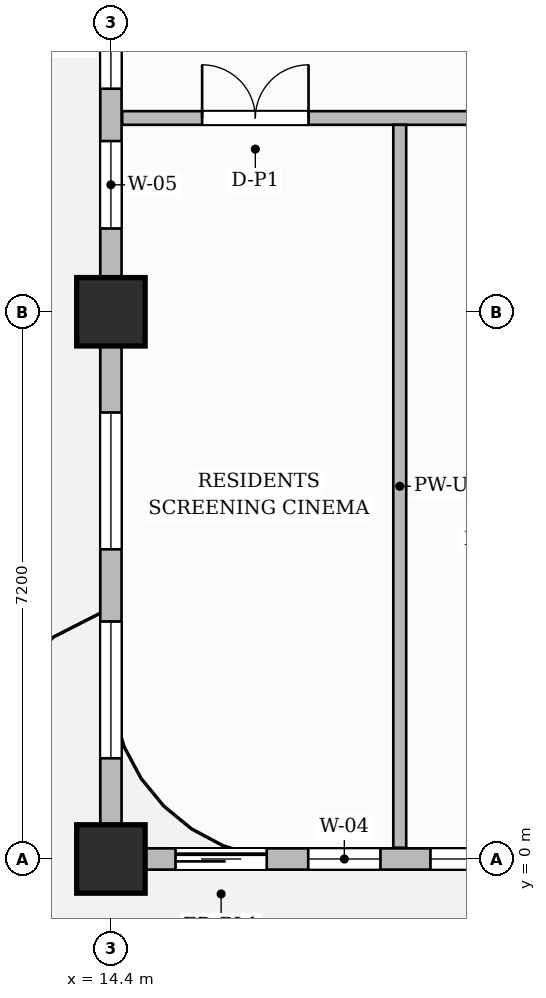
"""IFC4 building model, lengths in metres.
Left out: names, types, materials, properties, quantities, classifications, styles, units other than length and angle.
Written with IfcOpenShell. Run it as: python <this file> out.ifc"""

import sys

from ifc_helpers import new_model, si_unit, direction, frame, frame_2d, origin, origin_2d, place, context, subcontext, project, spatial, rectangle, extrude, source, transform, mapped, element, fill, save


model = new_model("IFC4")
c1 = context("Model", 3, precision=1e-05, world=origin(), true_north=direction((0.0, 1.0)))
c2 = subcontext(c1, "Body", "Model", "MODEL_VIEW")
j1 = project(units=[si_unit("LENGTHUNIT", "METRE"), si_unit("PLANEANGLEUNIT", "RADIAN")], contexts=[c1])
p1 = place(None, origin())
s1 = spatial("IfcSite", under=j1, at=p1, CompositionType="ELEMENT")
p2 = place(p1, origin())
s2 = spatial("IfcBuilding", under=s1, at=p2, CompositionType="ELEMENT")
p3 = place(p2, frame((0.0, 0.0, 228.85)))
s3 = spatial("IfcBuildingStorey", under=s2, at=p3, CompositionType="ELEMENT", Elevation=228.85)
m1 = source(origin(), c2, "Body", "SweptSolid", [
    extrude(rectangle(XDim=0.9, YDim=0.9, at=origin_2d()), origin(), (0.0, 0.0, 1.0), 3.85),
])
for number, where, z_axis, x_axis in (
    (1, (14.4, 0.0, 0.0), (0.0, 0.0, 1.0), (1.0, 0.0, 0.0)),
    (2, (14.4, 7.2, 0.0), (0.0, 0.0, 1.0), (1.0, 0.0, 0.0)),
):
    element("IfcColumn", number, at=place(p3, frame(where, z_axis=z_axis, x_axis=x_axis)), inside=s3, PredefinedType="COLUMN", context=c2, shape_type="MappedRepresentation", body=[
        mapped(m1, transform((0.0, 0.0, 0.0), scale=1.0)),
    ])
p4 = place(p3, frame((14.548, 9.75, 0.0), z_axis=(0.0, 0.0, 1.0), x_axis=(1.0, 0.0, 0.0)))
e3 = element("IfcWall", 3, at=p4, inside=s3, PredefinedType="PARTITIONING", context=c2, shape_type="SweptSolid", body=[
    extrude(rectangle(XDim=15.562, YDim=0.18, at=frame_2d((7.781, 0.0))), origin(), (0.0, 0.0, 1.0), 3.6),
])
p5 = place(p4, frame((1.052, 0.0, 0.0)))
e4 = element("IfcOpeningElement", 4, at=p5, cuts=e3, PredefinedType="OPENING", context=c2, shape_type="SweptSolid", body=[
    extrude(rectangle(XDim=1.4, YDim=2.35, at=frame_2d((0.7, 1.175))), frame((0.0, 0.1, 0.0), z_axis=(0.0, -1.0, 0.0), x_axis=(1.0, 0.0, 0.0)), (0.0, 0.0, 1.0), 0.2),
])
p6 = place(p4, frame((5.452, 0.0, 0.0)))
e5 = element("IfcOpeningElement", 5, at=p6, cuts=e3, PredefinedType="OPENING", context=c2, shape_type="SweptSolid", body=[
    extrude(rectangle(XDim=0.95, YDim=2.15, at=frame_2d((0.475, 1.075))), frame((0.0, 0.1, 0.0), z_axis=(0.0, -1.0, 0.0), x_axis=(1.0, 0.0, 0.0)), (0.0, 0.0, 1.0), 0.2),
])
p7 = place(p4, frame((10.807, 0.0, 0.0)))
e6 = element("IfcOpeningElement", 6, at=p7, cuts=e3, PredefinedType="OPENING", context=c2, shape_type="SweptSolid", body=[
    extrude(rectangle(XDim=1.05, YDim=2.25, at=frame_2d((0.525, 1.125))), frame((0.0, 0.1, 0.0), z_axis=(0.0, -1.0, 0.0), x_axis=(1.0, 0.0, 0.0)), (0.0, 0.0, 1.0), 0.2),
])
p8 = place(p3, frame((18.2, 0.148, 0.0), z_axis=(0.0, 0.0, 1.0), x_axis=(0.0, 1.0, 0.0)))
e7 = element("IfcWall", 7, at=p8, inside=s3, PredefinedType="PARTITIONING", context=c2, shape_type="SweptSolid", body=[
    extrude(rectangle(XDim=9.512, YDim=0.17, at=frame_2d((4.756, 0.0))), origin(), (0.0, 0.0, 1.0), 3.315),
])
p9 = place(p3, frame((14.4, 0.0, 0.0), z_axis=(0.0, 0.0, 1.0), x_axis=(1.0, 0.0, 0.0)))
e8 = element("IfcWall", 8, at=p9, inside=s3, PredefinedType="SOLIDWALL", context=c2, shape_type="SweptSolid", body=[
    extrude(rectangle(XDim=35.4, YDim=0.28, at=frame_2d((17.7, 0.0))), origin(), (0.0, 0.0, 1.0), 3.135),
])
p10 = place(p9, frame((0.85, 0.0, 0.0)))
e9 = element("IfcOpeningElement", 9, at=p10, cuts=e8, PredefinedType="OPENING", context=c2, shape_type="SweptSolid", body=[
    extrude(rectangle(XDim=1.2, YDim=2.2, at=frame_2d((0.6, 1.1))), frame((0.0, 0.15, 0.0), z_axis=(0.0, -1.0, 0.0), x_axis=(1.0, 0.0, 0.0)), (0.0, 0.0, 1.0), 0.3),
])
p11 = place(p9, frame((2.596, 0.0, 0.8)))
e10 = element("IfcOpeningElement", 10, at=p11, cuts=e8, PredefinedType="OPENING", context=c2, shape_type="SweptSolid", body=[
    extrude(rectangle(XDim=0.95, YDim=1.75, at=frame_2d((0.475, 0.875))), frame((0.0, 0.15, 0.0), z_axis=(0.0, -1.0, 0.0), x_axis=(1.0, 0.0, 0.0)), (0.0, 0.0, 1.0), 0.3),
])
p12 = place(p9, frame((4.204, 0.0, 0.8)))
e11 = element("IfcOpeningElement", 11, at=p12, cuts=e8, PredefinedType="OPENING", context=c2, shape_type="SweptSolid", body=[
    extrude(rectangle(XDim=1.8, YDim=1.85, at=frame_2d((0.9, 0.925))), frame((0.0, 0.15, 0.0), z_axis=(0.0, -1.0, 0.0), x_axis=(1.0, 0.0, 0.0)), (0.0, 0.0, 1.0), 0.3),
])
p13 = place(p9, frame((9.415, 0.0, 0.8)))
e12 = element("IfcOpeningElement", 12, at=p13, cuts=e8, PredefinedType="OPENING", context=c2, shape_type="SweptSolid", body=[
    extrude(rectangle(XDim=1.8, YDim=1.85, at=frame_2d((0.9, 0.925))), frame((0.0, 0.15, 0.0), z_axis=(0.0, -1.0, 0.0), x_axis=(1.0, 0.0, 0.0)), (0.0, 0.0, 1.0), 0.3),
])
p14 = place(p9, frame((12.469, 0.0, 0.8)))
e13 = element("IfcOpeningElement", 13, at=p14, cuts=e8, PredefinedType="OPENING", context=c2, shape_type="SweptSolid", body=[
    extrude(rectangle(XDim=0.95, YDim=1.75, at=frame_2d((0.475, 0.875))), frame((0.0, 0.15, 0.0), z_axis=(0.0, -1.0, 0.0), x_axis=(1.0, 0.0, 0.0)), (0.0, 0.0, 1.0), 0.3),
])
p15 = place(p9, frame((16.804, 0.0, 0.8)))
e14 = element("IfcOpeningElement", 14, at=p15, cuts=e8, PredefinedType="OPENING", context=c2, shape_type="SweptSolid", body=[
    extrude(rectangle(XDim=1.8, YDim=1.85, at=frame_2d((0.9, 0.925))), frame((0.0, 0.15, 0.0), z_axis=(0.0, -1.0, 0.0), x_axis=(1.0, 0.0, 0.0)), (0.0, 0.0, 1.0), 0.3),
])
p16 = place(p9, frame((22.396, 0.0, 0.8)))
e15 = element("IfcOpeningElement", 15, at=p16, cuts=e8, PredefinedType="OPENING", context=c2, shape_type="SweptSolid", body=[
    extrude(rectangle(XDim=1.8, YDim=1.85, at=frame_2d((0.9, 0.925))), frame((0.0, 0.15, 0.0), z_axis=(0.0, -1.0, 0.0), x_axis=(1.0, 0.0, 0.0)), (0.0, 0.0, 1.0), 0.3),
])
p17 = place(p9, frame((25.629, 0.0, 0.8)))
e16 = element("IfcOpeningElement", 16, at=p17, cuts=e8, PredefinedType="OPENING", context=c2, shape_type="SweptSolid", body=[
    extrude(rectangle(XDim=0.95, YDim=1.75, at=frame_2d((0.475, 0.875))), frame((0.0, 0.15, 0.0), z_axis=(0.0, -1.0, 0.0), x_axis=(1.0, 0.0, 0.0)), (0.0, 0.0, 1.0), 0.3),
])
p18 = place(p9, frame((29.075, 0.0, 0.8)))
e17 = element("IfcOpeningElement", 17, at=p18, cuts=e8, PredefinedType="OPENING", context=c2, shape_type="SweptSolid", body=[
    extrude(rectangle(XDim=1.8, YDim=1.85, at=frame_2d((0.9, 0.925))), frame((0.0, 0.15, 0.0), z_axis=(0.0, -1.0, 0.0), x_axis=(1.0, 0.0, 0.0)), (0.0, 0.0, 1.0), 0.3),
])
p19 = place(p9, frame((32.125, 0.0, 0.8)))
e18 = element("IfcOpeningElement", 18, at=p19, cuts=e8, PredefinedType="OPENING", context=c2, shape_type="SweptSolid", body=[
    extrude(rectangle(XDim=1.8, YDim=1.85, at=frame_2d((0.9, 0.925))), frame((0.0, 0.15, 0.0), z_axis=(0.0, -1.0, 0.0), x_axis=(1.0, 0.0, 0.0)), (0.0, 0.0, 1.0), 0.3),
])
p20 = place(p3, frame((14.4, 0.05, 0.0), z_axis=(0.0, 0.0, 1.0), x_axis=(0.0, 1.0, 0.0)))
e19 = element("IfcWall", 19, at=p20, inside=s3, PredefinedType="SOLIDWALL", context=c2, shape_type="SweptSolid", body=[
    extrude(rectangle(XDim=21.5, YDim=0.28, at=frame_2d((10.75, 0.0))), origin(), (0.0, 0.0, 1.0), 3.135),
])
p21 = place(p20, frame((1.275, 0.0, 0.8)))
e20 = element("IfcOpeningElement", 20, at=p21, cuts=e19, PredefinedType="OPENING", context=c2, shape_type="SweptSolid", body=[
    extrude(rectangle(XDim=1.8, YDim=1.85, at=frame_2d((0.9, 0.925))), frame((0.0, 0.15, 0.0), z_axis=(0.0, -1.0, 0.0), x_axis=(1.0, 0.0, 0.0)), (0.0, 0.0, 1.0), 0.3),
])
p22 = place(p20, frame((4.025, 0.0, 0.8)))
e21 = element("IfcOpeningElement", 21, at=p22, cuts=e19, PredefinedType="OPENING", context=c2, shape_type="SweptSolid", body=[
    extrude(rectangle(XDim=1.8, YDim=1.85, at=frame_2d((0.9, 0.925))), frame((0.0, 0.15, 0.0), z_axis=(0.0, -1.0, 0.0), x_axis=(1.0, 0.0, 0.0)), (0.0, 0.0, 1.0), 0.3),
])
p23 = place(p20, frame((8.246, 0.0, 0.8)))
e22 = element("IfcOpeningElement", 22, at=p23, cuts=e19, PredefinedType="OPENING", context=c2, shape_type="SweptSolid", body=[
    extrude(rectangle(XDim=1.15, YDim=1.8, at=frame_2d((0.575, 0.9))), frame((0.0, 0.15, 0.0), z_axis=(0.0, -1.0, 0.0), x_axis=(1.0, 0.0, 0.0)), (0.0, 0.0, 1.0), 0.3),
])
p24 = place(p20, frame((10.085, 0.0, 0.8)))
e23 = element("IfcOpeningElement", 23, at=p24, cuts=e19, PredefinedType="OPENING", context=c2, shape_type="SweptSolid", body=[
    extrude(rectangle(XDim=1.15, YDim=1.8, at=frame_2d((0.575, 0.9))), frame((0.0, 0.15, 0.0), z_axis=(0.0, -1.0, 0.0), x_axis=(1.0, 0.0, 0.0)), (0.0, 0.0, 1.0), 0.3),
])
p25 = place(p20, frame((12.014, 0.0, 0.8)))
e24 = element("IfcOpeningElement", 24, at=p25, cuts=e19, PredefinedType="OPENING", context=c2, shape_type="SweptSolid", body=[
    extrude(rectangle(XDim=1.15, YDim=1.8, at=frame_2d((0.575, 0.9))), frame((0.0, 0.15, 0.0), z_axis=(0.0, -1.0, 0.0), x_axis=(1.0, 0.0, 0.0)), (0.0, 0.0, 1.0), 0.3),
])
p26 = place(p20, frame((15.406, 0.0, 0.8)))
e25 = element("IfcOpeningElement", 25, at=p26, cuts=e19, PredefinedType="OPENING", context=c2, shape_type="SweptSolid", body=[
    extrude(rectangle(XDim=0.95, YDim=1.75, at=frame_2d((0.475, 0.875))), frame((0.0, 0.15, 0.0), z_axis=(0.0, -1.0, 0.0), x_axis=(1.0, 0.0, 0.0)), (0.0, 0.0, 1.0), 0.3),
])
p27 = place(p20, frame((17.789, 0.0, 0.8)))
e26 = element("IfcOpeningElement", 26, at=p27, cuts=e19, PredefinedType="OPENING", context=c2, shape_type="SweptSolid", body=[
    extrude(rectangle(XDim=1.8, YDim=1.85, at=frame_2d((0.9, 0.925))), frame((0.0, 0.15, 0.0), z_axis=(0.0, -1.0, 0.0), x_axis=(1.0, 0.0, 0.0)), (0.0, 0.0, 1.0), 0.3),
])
m2 = source(origin(), c2, "Body", "SweptSolid", [
    extrude(rectangle(XDim=1.4, YDim=2.35, at=frame_2d((0.7, 1.175))), frame((0.0, 0.025, 0.0), z_axis=(0.0, -1.0, 0.0), x_axis=(1.0, 0.0, 0.0)), (0.0, 0.0, 1.0), 0.05),
])
p28 = place(p5, origin())
e27 = element("IfcDoor", 27, at=p28, inside=s3, OperationType="DOUBLE_DOOR_SINGLE_SWING", PredefinedType="DOOR", context=c2, shape_type="MappedRepresentation", body=[
    mapped(m2, transform((0.0, 0.0, 0.0), scale=1.0)),
])
fill(e4, e27)
m3 = source(origin(), c2, "Body", "SweptSolid", [
    extrude(rectangle(XDim=1.2, YDim=2.2, at=frame_2d((0.6, 1.1))), frame((0.0, 0.025, 0.0), z_axis=(0.0, -1.0, 0.0), x_axis=(1.0, 0.0, 0.0)), (0.0, 0.0, 1.0), 0.05),
])
p29 = place(p10, origin())
e28 = element("IfcDoor", 28, at=p29, inside=s3, OperationType="SLIDING_TO_LEFT", PredefinedType="DOOR", context=c2, shape_type="MappedRepresentation", body=[
    mapped(m3, transform((0.0, 0.0, 0.0), scale=1.0)),
])
fill(e9, e28)
m4 = source(origin(), c2, "Body", "SweptSolid", [
    extrude(rectangle(XDim=0.95, YDim=1.75, at=frame_2d((0.475, 0.875))), frame((0.0, 0.03, 0.0), z_axis=(0.0, -1.0, 0.0), x_axis=(1.0, 0.0, 0.0)), (0.0, 0.0, 1.0), 0.06),
])
p30 = place(p11, origin())
e29 = element("IfcWindow", 29, at=p30, inside=s3, PartitioningType="SINGLE_PANEL", PredefinedType="WINDOW", context=c2, shape_type="MappedRepresentation", body=[
    mapped(m4, transform((0.0, 0.0, 0.0), scale=1.0)),
])
fill(e10, e29)
m5 = source(origin(), c2, "Body", "SweptSolid", [
    extrude(rectangle(XDim=1.8, YDim=1.85, at=frame_2d((0.9, 0.925))), frame((0.0, 0.03, 0.0), z_axis=(0.0, -1.0, 0.0), x_axis=(1.0, 0.0, 0.0)), (0.0, 0.0, 1.0), 0.06),
])
p31 = place(p12, origin())
e30 = element("IfcWindow", 30, at=p31, inside=s3, PartitioningType="DOUBLE_PANEL_VERTICAL", PredefinedType="WINDOW", context=c2, shape_type="MappedRepresentation", body=[
    mapped(m5, transform((0.0, 0.0, 0.0), scale=1.0)),
])
fill(e11, e30)
p32 = place(p21, origin())
e31 = element("IfcWindow", 31, at=p32, inside=s3, PartitioningType="DOUBLE_PANEL_VERTICAL", PredefinedType="WINDOW", context=c2, shape_type="MappedRepresentation", body=[
    mapped(m5, transform((0.0, 0.0, 0.0), scale=1.0)),
])
fill(e20, e31)
p33 = place(p22, origin())
e32 = element("IfcWindow", 32, at=p33, inside=s3, PartitioningType="DOUBLE_PANEL_VERTICAL", PredefinedType="WINDOW", context=c2, shape_type="MappedRepresentation", body=[
    mapped(m5, transform((0.0, 0.0, 0.0), scale=1.0)),
])
fill(e21, e32)
m6 = source(origin(), c2, "Body", "SweptSolid", [
    extrude(rectangle(XDim=1.15, YDim=1.8, at=frame_2d((0.575, 0.9))), frame((0.0, 0.03, 0.0), z_axis=(0.0, -1.0, 0.0), x_axis=(1.0, 0.0, 0.0)), (0.0, 0.0, 1.0), 0.06),
])
p34 = place(p23, origin())
e33 = element("IfcWindow", 33, at=p34, inside=s3, PartitioningType="SINGLE_PANEL", PredefinedType="WINDOW", context=c2, shape_type="MappedRepresentation", body=[
    mapped(m6, transform((0.0, 0.0, 0.0), scale=1.0)),
])
fill(e22, e33)
p35 = place(p24, origin())
e34 = element("IfcWindow", 34, at=p35, inside=s3, PartitioningType="SINGLE_PANEL", PredefinedType="WINDOW", context=c2, shape_type="MappedRepresentation", body=[
    mapped(m6, transform((0.0, 0.0, 0.0), scale=1.0)),
])
fill(e23, e34)
save(model, sys.argv[1])
